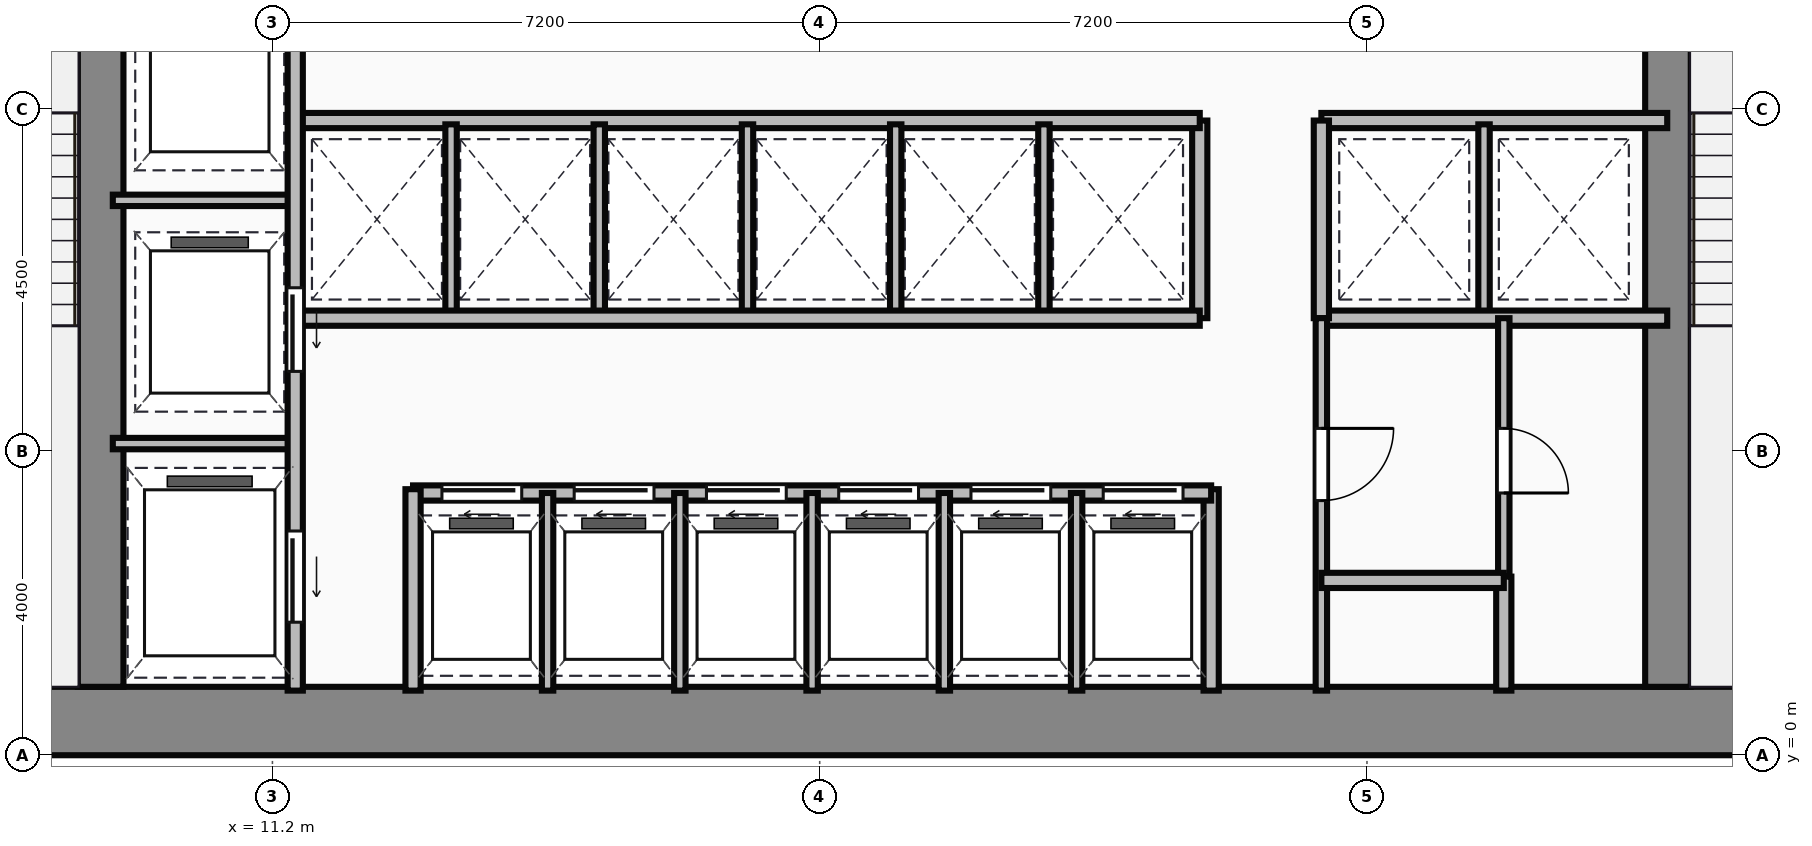
"""IFC4 building model, lengths in metres.
Left out: names, types, materials, properties, quantities, classifications, styles, units other than length and angle.
Written with IfcOpenShell. Run it as: python <this file> out.ifc"""

import sys

from ifc_helpers import new_model, si_unit, direction, frame, frame_2d, origin, place, context, subcontext, project, spatial, rectangle, extrude, source, transform, mapped, element, fill, save


model = new_model("IFC4")
c1 = context("Model", 3, precision=1e-05, world=origin(), true_north=direction((0.0, 1.0)))
c2 = subcontext(c1, "Body", "Model", "MODEL_VIEW")
j1 = project(units=[si_unit("LENGTHUNIT", "METRE"), si_unit("PLANEANGLEUNIT", "RADIAN")], contexts=[c1])
p1 = place(None, origin())
s1 = spatial("IfcSite", under=j1, at=p1, CompositionType="ELEMENT")
p2 = place(p1, origin())
s2 = spatial("IfcBuilding", under=s1, at=p2, CompositionType="ELEMENT")
p3 = place(p2, frame((0.0, 0.0, 50.75)))
s3 = spatial("IfcBuildingStorey", under=s2, at=p3, CompositionType="ELEMENT", Elevation=50.75)
m1 = source(origin(), c2, "Body", "SweptSolid", [
    extrude(rectangle(XDim=29.5, YDim=0.9, at=frame_2d((14.75, 0.0))), origin(), (0.0, 0.0, 1.0), 3.65),
])
p4 = place(p3, frame((4.5, 0.45, 0.0), z_axis=(0.0, 0.0, 1.0), x_axis=(1.0, 0.0, 0.0)))
e1 = element("IfcWall", 1, at=p4, inside=s3, PredefinedType="SHEAR", context=c2, shape_type="MappedRepresentation", body=[
    mapped(m1, transform((0.0, 0.0, 0.0))),
])
m2 = source(origin(), c2, "Body", "SweptSolid", [
    extrude(rectangle(XDim=12.2, YDim=0.6, at=frame_2d((6.1, 0.0))), origin(), (0.0, 0.0, 1.0), 3.65),
])
for number, where, z_axis, x_axis in (
    (2, (8.94, 0.9, 0.0), (0.0, 0.0, 1.0), (0.0, 1.0, 0.0)),
    (3, (29.56, 0.9, 0.0), (0.0, 0.0, 1.0), (0.0, 1.0, 0.0)),
):
    element("IfcWall", number, at=place(p3, frame(where, z_axis=z_axis, x_axis=x_axis)), inside=s3, PredefinedType="SHEAR", context=c2, shape_type="MappedRepresentation", body=[
        mapped(m2, transform((0.0, 0.0, 0.0))),
    ])
m3 = source(origin(), c2, "Body", "SweptSolid", [
    extrude(rectangle(XDim=9.6, YDim=0.2, at=frame_2d((4.8, 0.0))), origin(), (0.0, 0.0, 1.0), 3.4),
])
p5 = place(p3, frame((11.5, 0.85, 0.0), z_axis=(0.0, 0.0, 1.0), x_axis=(0.0, 1.0, 0.0)))
e4 = element("IfcWall", 4, at=p5, inside=s3, PredefinedType="PARTITIONING", context=c2, shape_type="MappedRepresentation", body=[
    mapped(m3, transform((0.0, 0.0, 0.0))),
])
p6 = place(p5, frame((4.2, 0.0, 0.0)))
e5 = element("IfcOpeningElement", 5, at=p6, cuts=e4, PredefinedType="OPENING", context=c2, shape_type="SweptSolid", body=[
    extrude(rectangle(XDim=1.1, YDim=2.15, at=frame_2d((0.55, 1.075))), frame((0.0, 0.11, 0.0), z_axis=(0.0, -1.0, 0.0), x_axis=(1.0, 0.0, 0.0)), (0.0, 0.0, 1.0), 0.22),
])
p7 = place(p5, frame((0.9, 0.0, 0.0)))
e6 = element("IfcOpeningElement", 6, at=p7, cuts=e4, PredefinedType="OPENING", context=c2, shape_type="SweptSolid", body=[
    extrude(rectangle(XDim=1.2, YDim=2.15, at=frame_2d((0.6, 1.075))), frame((0.0, 0.11, 0.0), z_axis=(0.0, -1.0, 0.0), x_axis=(1.0, 0.0, 0.0)), (0.0, 0.0, 1.0), 0.22),
])
m4 = source(origin(), c2, "Body", "SweptSolid", [
    extrude(rectangle(XDim=2.4, YDim=0.15, at=frame_2d((1.2, 0.0))), origin(), (0.0, 0.0, 1.0), 3.4),
])
for number, where, z_axis, x_axis in (
    (7, (9.1, 4.1, 0.0), (0.0, 0.0, 1.0), (1.0, 0.0, 0.0)),
    (8, (9.1, 7.3, 0.0), (0.0, 0.0, 1.0), (1.0, 0.0, 0.0)),
):
    element("IfcWall", number, at=place(p3, frame(where, z_axis=z_axis, x_axis=x_axis)), inside=s3, PredefinedType="PARTITIONING", context=c2, shape_type="MappedRepresentation", body=[
        mapped(m4, transform((0.0, 0.0, 0.0))),
    ])
m5 = source(origin(), c2, "Body", "SweptSolid", [
    extrude(rectangle(XDim=2.65, YDim=0.2, at=frame_2d((1.325, 0.0))), origin(), (0.0, 0.0, 1.0), 3.4),
])
p8 = place(p3, frame((13.05, 0.85, 0.0), z_axis=(0.0, 0.0, 1.0), x_axis=(0.0, 1.0, 0.0)))
e9 = element("IfcWall", 9, at=p8, inside=s3, PredefinedType="PARTITIONING", context=c2, shape_type="MappedRepresentation", body=[
    mapped(m5, transform((0.0, 0.0, 0.0))),
])
m6 = source(origin(), c2, "Body", "SweptSolid", [
    extrude(rectangle(XDim=10.5, YDim=0.2, at=frame_2d((5.25, 0.0))), origin(), (0.0, 0.0, 1.0), 3.4),
])
p9 = place(p3, frame((13.05, 3.45, 0.0), z_axis=(0.0, 0.0, 1.0), x_axis=(1.0, 0.0, 0.0)))
e10 = element("IfcWall", 10, at=p9, inside=s3, PredefinedType="PARTITIONING", context=c2, shape_type="MappedRepresentation", body=[
    mapped(m6, transform((0.0, 0.0, 0.0))),
])
p10 = place(p9, frame((0.38, 0.0, 0.0)))
e11 = element("IfcOpeningElement", 11, at=p10, cuts=e10, PredefinedType="OPENING", context=c2, shape_type="SweptSolid", body=[
    extrude(rectangle(XDim=1.05, YDim=2.15, at=frame_2d((0.525, 1.075))), frame((0.0, 0.11, 0.0), z_axis=(0.0, -1.0, 0.0), x_axis=(1.0, 0.0, 0.0)), (0.0, 0.0, 1.0), 0.22),
])
p11 = place(p9, frame((2.12, 0.0, 0.0)))
e12 = element("IfcOpeningElement", 12, at=p11, cuts=e10, PredefinedType="OPENING", context=c2, shape_type="SweptSolid", body=[
    extrude(rectangle(XDim=1.05, YDim=2.15, at=frame_2d((0.525, 1.075))), frame((0.0, 0.11, 0.0), z_axis=(0.0, -1.0, 0.0), x_axis=(1.0, 0.0, 0.0)), (0.0, 0.0, 1.0), 0.22),
])
p12 = place(p9, frame((3.86, 0.0, 0.0)))
e13 = element("IfcOpeningElement", 13, at=p12, cuts=e10, PredefinedType="OPENING", context=c2, shape_type="SweptSolid", body=[
    extrude(rectangle(XDim=1.05, YDim=2.15, at=frame_2d((0.525, 1.075))), frame((0.0, 0.11, 0.0), z_axis=(0.0, -1.0, 0.0), x_axis=(1.0, 0.0, 0.0)), (0.0, 0.0, 1.0), 0.22),
])
p13 = place(p9, frame((5.6, 0.0, 0.0)))
e14 = element("IfcOpeningElement", 14, at=p13, cuts=e10, PredefinedType="OPENING", context=c2, shape_type="SweptSolid", body=[
    extrude(rectangle(XDim=1.05, YDim=2.15, at=frame_2d((0.525, 1.075))), frame((0.0, 0.11, 0.0), z_axis=(0.0, -1.0, 0.0), x_axis=(1.0, 0.0, 0.0)), (0.0, 0.0, 1.0), 0.22),
])
p14 = place(p9, frame((7.34, 0.0, 0.0)))
e15 = element("IfcOpeningElement", 15, at=p14, cuts=e10, PredefinedType="OPENING", context=c2, shape_type="SweptSolid", body=[
    extrude(rectangle(XDim=1.05, YDim=2.15, at=frame_2d((0.525, 1.075))), frame((0.0, 0.11, 0.0), z_axis=(0.0, -1.0, 0.0), x_axis=(1.0, 0.0, 0.0)), (0.0, 0.0, 1.0), 0.22),
])
p15 = place(p9, frame((9.08, 0.0, 0.0)))
e16 = element("IfcOpeningElement", 16, at=p15, cuts=e10, PredefinedType="OPENING", context=c2, shape_type="SweptSolid", body=[
    extrude(rectangle(XDim=1.05, YDim=2.15, at=frame_2d((0.525, 1.075))), frame((0.0, 0.11, 0.0), z_axis=(0.0, -1.0, 0.0), x_axis=(1.0, 0.0, 0.0)), (0.0, 0.0, 1.0), 0.22),
])
p16 = place(p3, frame((23.55, 0.85, 0.0), z_axis=(0.0, 0.0, 1.0), x_axis=(0.0, 1.0, 0.0)))
e17 = element("IfcWall", 17, at=p16, inside=s3, PredefinedType="PARTITIONING", context=c2, shape_type="MappedRepresentation", body=[
    mapped(m5, transform((0.0, 0.0, 0.0))),
])
m7 = source(origin(), c2, "Body", "SweptSolid", [
    extrude(rectangle(XDim=2.6, YDim=0.15, at=frame_2d((1.3, 0.0))), origin(), (0.0, 0.0, 1.0), 3.4),
])
for number, where, z_axis, x_axis in (
    (18, (14.82, 0.85, 0.0), (0.0, 0.0, 1.0), (0.0, 1.0, 0.0)),
    (19, (16.56, 0.85, 0.0), (0.0, 0.0, 1.0), (0.0, 1.0, 0.0)),
    (20, (18.3, 0.85, 0.0), (0.0, 0.0, 1.0), (0.0, 1.0, 0.0)),
    (21, (20.04, 0.85, 0.0), (0.0, 0.0, 1.0), (0.0, 1.0, 0.0)),
    (22, (21.78, 0.85, 0.0), (0.0, 0.0, 1.0), (0.0, 1.0, 0.0)),
):
    element("IfcWall", number, at=place(p3, frame(where, z_axis=z_axis, x_axis=x_axis)), inside=s3, PredefinedType="PARTITIONING", context=c2, shape_type="MappedRepresentation", body=[
        mapped(m7, transform((0.0, 0.0, 0.0))),
    ])
m8 = source(origin(), c2, "Body", "SweptSolid", [
    extrude(rectangle(XDim=11.85, YDim=0.2, at=frame_2d((5.925, 0.0))), origin(), (0.0, 0.0, 1.0), 3.4),
])
for number, where, z_axis, x_axis in (
    (23, (11.55, 5.75, 0.0), (0.0, 0.0, 1.0), (1.0, 0.0, 0.0)),
    (24, (11.55, 8.35, 0.0), (0.0, 0.0, 1.0), (1.0, 0.0, 0.0)),
):
    element("IfcWall", number, at=place(p3, frame(where, z_axis=z_axis, x_axis=x_axis)), inside=s3, PredefinedType="PARTITIONING", context=c2, shape_type="MappedRepresentation", body=[
        mapped(m8, transform((0.0, 0.0, 0.0))),
    ])
m9 = source(origin(), c2, "Body", "SweptSolid", [
    extrude(rectangle(XDim=2.6, YDim=0.2, at=frame_2d((1.3, 0.0))), origin(), (0.0, 0.0, 1.0), 3.4),
])
p17 = place(p3, frame((23.4, 5.75, 0.0), z_axis=(0.0, 0.0, 1.0), x_axis=(0.0, 1.0, 0.0)))
e25 = element("IfcWall", 25, at=p17, inside=s3, PredefinedType="PARTITIONING", context=c2, shape_type="MappedRepresentation", body=[
    mapped(m9, transform((0.0, 0.0, 0.0))),
])
m10 = source(origin(), c2, "Body", "SweptSolid", [
    extrude(rectangle(XDim=2.5, YDim=0.15, at=frame_2d((1.25, 0.0))), origin(), (0.0, 0.0, 1.0), 3.4),
])
for number, where, z_axis, x_axis in (
    (26, (13.55, 5.8, 0.0), (0.0, 0.0, 1.0), (0.0, 1.0, 0.0)),
    (27, (15.5, 5.8, 0.0), (0.0, 0.0, 1.0), (0.0, 1.0, 0.0)),
    (28, (17.45, 5.8, 0.0), (0.0, 0.0, 1.0), (0.0, 1.0, 0.0)),
    (29, (19.4, 5.8, 0.0), (0.0, 0.0, 1.0), (0.0, 1.0, 0.0)),
    (30, (21.35, 5.8, 0.0), (0.0, 0.0, 1.0), (0.0, 1.0, 0.0)),
):
    element("IfcWall", number, at=place(p3, frame(where, z_axis=z_axis, x_axis=x_axis)), inside=s3, PredefinedType="PARTITIONING", context=c2, shape_type="MappedRepresentation", body=[
        mapped(m10, transform((0.0, 0.0, 0.0))),
    ])
m11 = source(origin(), c2, "Body", "SweptSolid", [
    extrude(rectangle(XDim=4.55, YDim=0.2, at=frame_2d((2.275, 0.0))), origin(), (0.0, 0.0, 1.0), 3.4),
])
for number, where, z_axis, x_axis in (
    (31, (25.0, 8.35, 0.0), (0.0, 0.0, 1.0), (1.0, 0.0, 0.0)),
    (32, (25.0, 5.75, 0.0), (0.0, 0.0, 1.0), (1.0, 0.0, 0.0)),
):
    element("IfcWall", number, at=place(p3, frame(where, z_axis=z_axis, x_axis=x_axis)), inside=s3, PredefinedType="PARTITIONING", context=c2, shape_type="MappedRepresentation", body=[
        mapped(m11, transform((0.0, 0.0, 0.0))),
    ])
p18 = place(p3, frame((25.0, 5.75, 0.0), z_axis=(0.0, 0.0, 1.0), x_axis=(0.0, 1.0, 0.0)))
e33 = element("IfcWall", 33, at=p18, inside=s3, PredefinedType="PARTITIONING", context=c2, shape_type="MappedRepresentation", body=[
    mapped(m9, transform((0.0, 0.0, 0.0))),
])
p19 = place(p3, frame((27.14, 5.8, 0.0), z_axis=(0.0, 0.0, 1.0), x_axis=(0.0, 1.0, 0.0)))
e34 = element("IfcWall", 34, at=p19, inside=s3, PredefinedType="PARTITIONING", context=c2, shape_type="MappedRepresentation", body=[
    mapped(m10, transform((0.0, 0.0, 0.0))),
])
m12 = source(origin(), c2, "Body", "SweptSolid", [
    extrude(rectangle(XDim=4.9, YDim=0.15, at=frame_2d((2.45, 0.0))), origin(), (0.0, 0.0, 1.0), 3.4),
])
p20 = place(p3, frame((25.0, 0.85, 0.0), z_axis=(0.0, 0.0, 1.0), x_axis=(0.0, 1.0, 0.0)))
e35 = element("IfcWall", 35, at=p20, inside=s3, PredefinedType="PARTITIONING", context=c2, shape_type="MappedRepresentation", body=[
    mapped(m12, transform((0.0, 0.0, 0.0))),
])
p21 = place(p20, frame((2.5, 0.0, 0.0)))
e36 = element("IfcOpeningElement", 36, at=p21, cuts=e35, PredefinedType="OPENING", context=c2, shape_type="SweptSolid", body=[
    extrude(rectangle(XDim=0.95, YDim=2.15, at=frame_2d((0.475, 1.075))), frame((0.0, 0.085, 0.0), z_axis=(0.0, -1.0, 0.0), x_axis=(1.0, 0.0, 0.0)), (0.0, 0.0, 1.0), 0.17),
])
m13 = source(origin(), c2, "Body", "SweptSolid", [
    extrude(rectangle(XDim=2.4, YDim=0.2, at=frame_2d((1.2, 0.0))), origin(), (0.0, 0.0, 1.0), 3.4),
])
p22 = place(p3, frame((25.0, 2.3, 0.0), z_axis=(0.0, 0.0, 1.0), x_axis=(1.0, 0.0, 0.0)))
e37 = element("IfcWall", 37, at=p22, inside=s3, PredefinedType="PARTITIONING", context=c2, shape_type="MappedRepresentation", body=[
    mapped(m13, transform((0.0, 0.0, 0.0))),
])
m14 = source(origin(), c2, "Body", "SweptSolid", [
    extrude(rectangle(XDim=1.5, YDim=0.2, at=frame_2d((0.75, 0.0))), origin(), (0.0, 0.0, 1.0), 3.4),
])
p23 = place(p3, frame((27.4, 0.85, 0.0), z_axis=(0.0, 0.0, 1.0), x_axis=(0.0, 1.0, 0.0)))
e38 = element("IfcWall", 38, at=p23, inside=s3, PredefinedType="PARTITIONING", context=c2, shape_type="MappedRepresentation", body=[
    mapped(m14, transform((0.0, 0.0, 0.0))),
])
m15 = source(origin(), c2, "Body", "SweptSolid", [
    extrude(rectangle(XDim=3.4, YDim=0.15, at=frame_2d((1.7, 0.0))), origin(), (0.0, 0.0, 1.0), 3.4),
])
p24 = place(p3, frame((27.4, 2.35, 0.0), z_axis=(0.0, 0.0, 1.0), x_axis=(0.0, 1.0, 0.0)))
e39 = element("IfcWall", 39, at=p24, inside=s3, PredefinedType="PARTITIONING", context=c2, shape_type="MappedRepresentation", body=[
    mapped(m15, transform((0.0, 0.0, 0.0))),
])
p25 = place(p24, frame((1.1, 0.0, 0.0)))
e40 = element("IfcOpeningElement", 40, at=p25, cuts=e39, PredefinedType="OPENING", context=c2, shape_type="SweptSolid", body=[
    extrude(rectangle(XDim=0.85, YDim=2.1, at=frame_2d((0.425, 1.05))), frame((0.0, 0.085, 0.0), z_axis=(0.0, -1.0, 0.0), x_axis=(1.0, 0.0, 0.0)), (0.0, 0.0, 1.0), 0.17),
])
m16 = source(origin(), c2, "Body", "SweptSolid", [
    extrude(rectangle(XDim=1.1, YDim=2.15, at=frame_2d((0.55, 1.075))), frame((0.0, 0.025, 0.0), z_axis=(0.0, -1.0, 0.0), x_axis=(1.0, 0.0, 0.0)), (0.0, 0.0, 1.0), 0.05),
])
p26 = place(p6, frame((1.1, 0.0, 0.0), z_axis=(0.0, 0.0, 1.0), x_axis=(-1.0, 0.0, 0.0)))
e41 = element("IfcDoor", 41, at=p26, inside=s3, OperationType="SLIDING_TO_LEFT", PredefinedType="DOOR", context=c2, shape_type="MappedRepresentation", body=[
    mapped(m16, transform((0.0, 0.0, 0.0))),
])
fill(e5, e41)
m17 = source(origin(), c2, "Body", "SweptSolid", [
    extrude(rectangle(XDim=1.2, YDim=2.15, at=frame_2d((0.6, 1.075))), frame((0.0, 0.025, 0.0), z_axis=(0.0, -1.0, 0.0), x_axis=(1.0, 0.0, 0.0)), (0.0, 0.0, 1.0), 0.05),
])
p27 = place(p7, frame((1.2, 0.0, 0.0), z_axis=(0.0, 0.0, 1.0), x_axis=(-1.0, 0.0, 0.0)))
e42 = element("IfcDoor", 42, at=p27, inside=s3, OperationType="SLIDING_TO_LEFT", PredefinedType="DOOR", context=c2, shape_type="MappedRepresentation", body=[
    mapped(m17, transform((0.0, 0.0, 0.0))),
])
fill(e6, e42)
m18 = source(origin(), c2, "Body", "SweptSolid", [
    extrude(rectangle(XDim=1.05, YDim=2.15, at=frame_2d((0.525, 1.075))), frame((0.0, 0.025, 0.0), z_axis=(0.0, -1.0, 0.0), x_axis=(1.0, 0.0, 0.0)), (0.0, 0.0, 1.0), 0.05),
])
p28 = place(p10, origin())
e43 = element("IfcDoor", 43, at=p28, inside=s3, OperationType="SLIDING_TO_LEFT", PredefinedType="DOOR", context=c2, shape_type="MappedRepresentation", body=[
    mapped(m18, transform((0.0, 0.0, 0.0))),
])
fill(e11, e43)
p29 = place(p11, origin())
e44 = element("IfcDoor", 44, at=p29, inside=s3, OperationType="SLIDING_TO_LEFT", PredefinedType="DOOR", context=c2, shape_type="MappedRepresentation", body=[
    mapped(m18, transform((0.0, 0.0, 0.0))),
])
fill(e12, e44)
p30 = place(p12, origin())
e45 = element("IfcDoor", 45, at=p30, inside=s3, OperationType="SLIDING_TO_LEFT", PredefinedType="DOOR", context=c2, shape_type="MappedRepresentation", body=[
    mapped(m18, transform((0.0, 0.0, 0.0))),
])
fill(e13, e45)
p31 = place(p13, origin())
e46 = element("IfcDoor", 46, at=p31, inside=s3, OperationType="SLIDING_TO_LEFT", PredefinedType="DOOR", context=c2, shape_type="MappedRepresentation", body=[
    mapped(m18, transform((0.0, 0.0, 0.0))),
])
fill(e14, e46)
p32 = place(p14, origin())
e47 = element("IfcDoor", 47, at=p32, inside=s3, OperationType="SLIDING_TO_LEFT", PredefinedType="DOOR", context=c2, shape_type="MappedRepresentation", body=[
    mapped(m18, transform((0.0, 0.0, 0.0))),
])
fill(e15, e47)
p33 = place(p15, origin())
e48 = element("IfcDoor", 48, at=p33, inside=s3, OperationType="SLIDING_TO_LEFT", PredefinedType="DOOR", context=c2, shape_type="MappedRepresentation", body=[
    mapped(m18, transform((0.0, 0.0, 0.0))),
])
fill(e16, e48)
m19 = source(origin(), c2, "Body", "SweptSolid", [
    extrude(rectangle(XDim=0.95, YDim=2.15, at=frame_2d((0.475, 1.075))), frame((0.0, 0.025, 0.0), z_axis=(0.0, -1.0, 0.0), x_axis=(1.0, 0.0, 0.0)), (0.0, 0.0, 1.0), 0.05),
])
p34 = place(p21, origin())
e49 = element("IfcDoor", 49, at=p34, inside=s3, OperationType="SINGLE_SWING_RIGHT", PredefinedType="DOOR", context=c2, shape_type="MappedRepresentation", body=[
    mapped(m19, transform((0.0, 0.0, 0.0))),
])
fill(e36, e49)
m20 = source(origin(), c2, "Body", "SweptSolid", [
    extrude(rectangle(XDim=0.85, YDim=2.1, at=frame_2d((0.425, 1.05))), frame((0.0, 0.025, 0.0), z_axis=(0.0, -1.0, 0.0), x_axis=(1.0, 0.0, 0.0)), (0.0, 0.0, 1.0), 0.05),
])
p35 = place(p25, frame((0.85, 0.0, 0.0), z_axis=(0.0, 0.0, 1.0), x_axis=(-1.0, 0.0, 0.0)))
e50 = element("IfcDoor", 50, at=p35, inside=s3, OperationType="SINGLE_SWING_LEFT", PredefinedType="DOOR", context=c2, shape_type="MappedRepresentation", body=[
    mapped(m20, transform((0.0, 0.0, 0.0))),
])
fill(e40, e50)
save(model, sys.argv[1])
